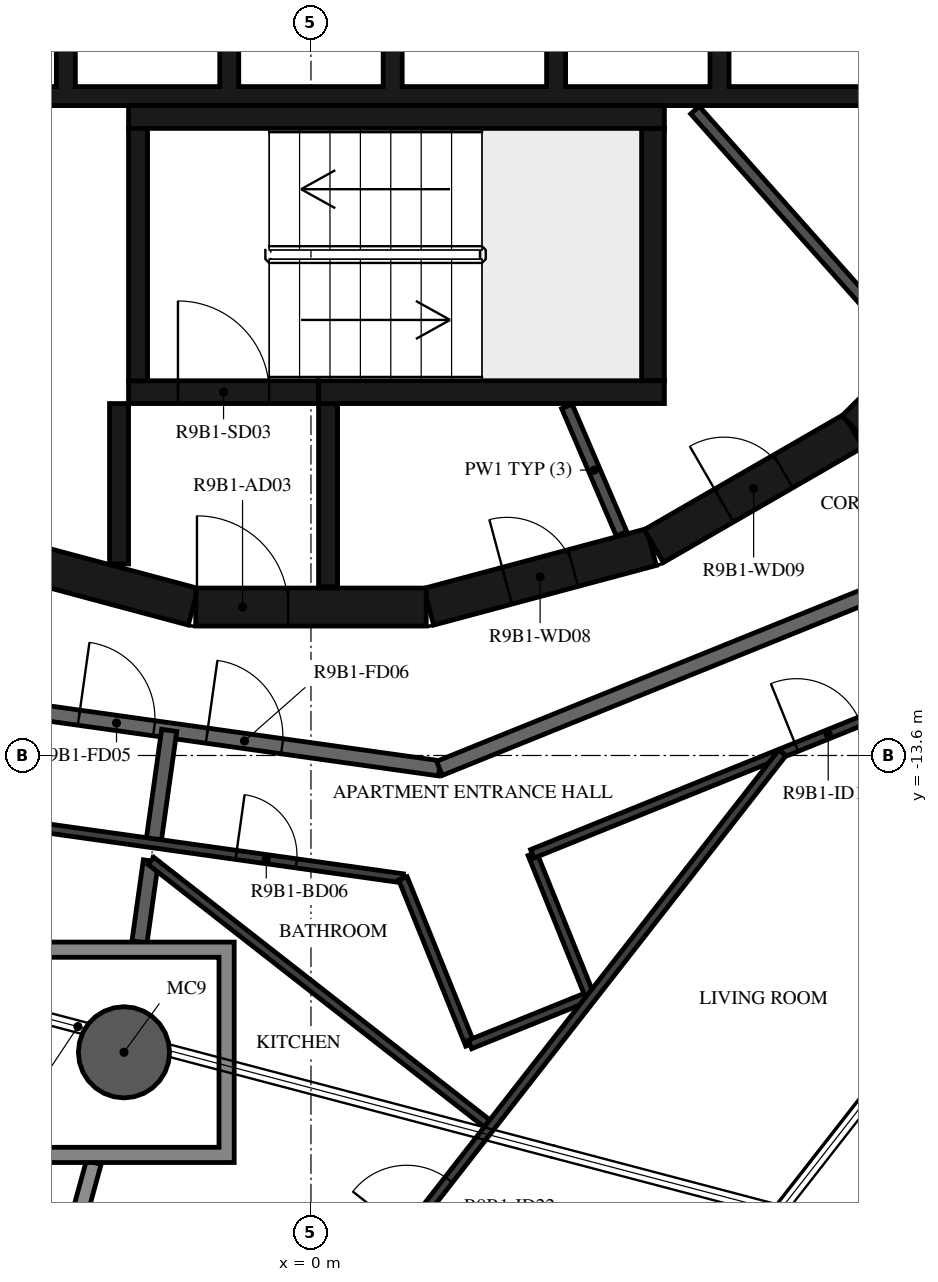
"""IFC4 building model, lengths in metres.
Left out: names, types, materials, properties, quantities, classifications, styles, units other than length and angle.
Written with IfcOpenShell. Run it as: python <this file> out.ifc"""

import sys

from ifc_helpers import new_model, si_unit, direction, frame, frame_2d, origin, origin_2d, place, context, subcontext, project, spatial, polyline, rectangle, hollow_circle, outline, extrude, element, fill, save


model = new_model("IFC4")
c1 = context("Model", 3, precision=1e-05, world=origin(), true_north=direction((0.0, 1.0)))
c2 = subcontext(c1, "Body", "Model", "MODEL_VIEW")
j1 = project(units=[si_unit("LENGTHUNIT", "METRE"), si_unit("PLANEANGLEUNIT", "RADIAN")], contexts=[c1])
p1 = place(None, origin())
s1 = spatial("IfcSite", under=j1, at=p1, CompositionType="ELEMENT")
p2 = place(p1, origin())
s2 = spatial("IfcBuilding", under=s1, at=p2, CompositionType="ELEMENT")
p3 = place(p2, frame((0.0, 0.0, 350.5)))
s3 = spatial("IfcBuildingStorey", under=s2, at=p3, CompositionType="ELEMENT", Elevation=350.5)
p4 = place(p3, frame((-2.46, -17.505, -0.38), z_axis=(0.0, 0.0, 1.0), x_axis=(1.0, 0.0, 0.0)))
e1 = element("IfcColumn", 1, at=p4, inside=s3, PredefinedType="COLUMN", context=c2, shape_type="SweptSolid", body=[
    extrude(hollow_circle(Radius=0.6, WallThickness=0.03, at=origin_2d()), origin(), (0.0, 0.0, 1.0), 3.5),
])
p5 = place(p3, frame((1.55, -11.643, 0.0), z_axis=(0.0, 0.0, 1.0), x_axis=(0.965948410781, 0.258734743916, 0.0)))
e2 = element("IfcWall", 2, at=p5, inside=s3, PredefinedType="SHEAR", context=c2, shape_type="SweptSolid", body=[
    extrude(rectangle(XDim=3.033, YDim=0.5, at=frame_2d((1.516, 0.0))), origin(), (0.0, 0.0, 1.0), 3.12),
])
p6 = place(p5, frame((1.066, 0.0, 0.0)))
e3 = element("IfcOpeningElement", 3, at=p6, cuts=e2, PredefinedType="OPENING", context=c2, shape_type="SweptSolid", body=[
    extrude(rectangle(XDim=0.9, YDim=2.1, at=frame_2d((0.45, 1.05))), frame((0.0, 0.26, 0.0), z_axis=(0.0, -1.0, 0.0), x_axis=(1.0, 0.0, 0.0)), (0.0, 0.0, 1.0), 0.52),
])
p7 = place(p3, frame((4.51, -10.845, 0.0), z_axis=(0.0, 0.0, 1.0), x_axis=(0.865975092491, 0.500087131594, 0.0)))
e4 = element("IfcWall", 4, at=p7, inside=s3, PredefinedType="SHEAR", context=c2, shape_type="SweptSolid", body=[
    extrude(rectangle(XDim=3.033, YDim=0.5, at=frame_2d((1.516, 0.0))), origin(), (0.0, 0.0, 1.0), 3.12),
])
p8 = place(p7, frame((1.066, 0.0, 0.0)))
e5 = element("IfcOpeningElement", 5, at=p8, cuts=e4, PredefinedType="OPENING", context=c2, shape_type="SweptSolid", body=[
    extrude(rectangle(XDim=0.9, YDim=2.1, at=frame_2d((0.45, 1.05))), frame((0.0, 0.26, 0.0), z_axis=(0.0, -1.0, 0.0), x_axis=(1.0, 0.0, 0.0)), (0.0, 0.0, 1.0), 0.52),
])
p9 = place(p3, frame((7.164, -9.308, 0.0), z_axis=(0.0, 0.0, 1.0), x_axis=(0.707106781187, 0.707106781187, 0.0)))
e6 = element("IfcWall", 6, at=p9, inside=s3, PredefinedType="SHEAR", context=c2, shape_type="SweptSolid", body=[
    extrude(rectangle(XDim=3.032, YDim=0.5, at=frame_2d((1.516, 0.0))), origin(), (0.0, 0.0, 1.0), 3.12),
])
p10 = place(p9, frame((1.566, 0.0, 0.0)))
e7 = element("IfcOpeningElement", 7, at=p10, cuts=e6, PredefinedType="OPENING", context=c2, shape_type="SweptSolid", body=[
    extrude(rectangle(XDim=0.9, YDim=2.1, at=frame_2d((0.45, 1.05))), frame((0.0, 0.26, 0.0), z_axis=(0.0, -1.0, 0.0), x_axis=(1.0, 0.0, 0.0)), (0.0, 0.0, 1.0), 0.52),
])
p11 = place(p3, frame((-4.479, -10.858, 0.0), z_axis=(0.0, 0.0, 1.0), x_axis=(0.965948410781, -0.258734743916, 0.0)))
e8 = element("IfcWall", 8, at=p11, inside=s3, PredefinedType="SHEAR", context=c2, shape_type="SweptSolid", body=[
    extrude(rectangle(XDim=3.033, YDim=0.5, at=frame_2d((1.516, 0.0))), origin(), (0.0, 0.0, 1.0), 3.12),
])
p12 = place(p3, frame((-1.516, -11.647, 0.0), z_axis=(0.0, 0.0, 1.0), x_axis=(1.0, 0.0, 0.0)))
e9 = element("IfcWall", 9, at=p12, inside=s3, PredefinedType="SHEAR", context=c2, shape_type="SweptSolid", body=[
    extrude(rectangle(XDim=3.033, YDim=0.5, at=frame_2d((1.516, 0.0))), origin(), (0.0, 0.0, 1.0), 3.12),
])
p13 = place(p12, frame((0.016, 0.0, 0.0)))
e10 = element("IfcOpeningElement", 10, at=p13, cuts=e9, PredefinedType="OPENING", context=c2, shape_type="SweptSolid", body=[
    extrude(rectangle(XDim=1.2, YDim=2.1, at=frame_2d((0.6, 1.05))), frame((0.0, 0.26, 0.0), z_axis=(0.0, -1.0, 0.0), x_axis=(1.0, 0.0, 0.0)), (0.0, 0.0, 1.0), 0.52),
])
p14 = place(p3, frame((-2.275, -8.67, 0.0), z_axis=(0.0, 0.0, 1.0), x_axis=(0.0, 1.0, 0.0)))
e11 = element("IfcWall", 11, at=p14, inside=s3, PredefinedType="SHEAR", context=c2, shape_type="SweptSolid", body=[
    extrude(rectangle(XDim=3.32, YDim=0.25, at=frame_2d((1.66, 0.0))), origin(), (0.0, 0.0, 1.0), 3.12),
])
p15 = place(p3, frame((-2.4, -5.2, 0.0), z_axis=(0.0, 0.0, 1.0), x_axis=(1.0, 0.0, 0.0)))
e12 = element("IfcWall", 12, at=p15, inside=s3, PredefinedType="SHEAR", context=c2, shape_type="SweptSolid", body=[
    extrude(rectangle(XDim=7.05, YDim=0.3, at=frame_2d((3.525, 0.0))), origin(), (0.0, 0.0, 1.0), 3.12),
])
p16 = place(p3, frame((4.5, -8.67, 0.0), z_axis=(0.0, 0.0, 1.0), x_axis=(0.0, 1.0, 0.0)))
e13 = element("IfcWall", 13, at=p16, inside=s3, PredefinedType="SHEAR", context=c2, shape_type="SweptSolid", body=[
    extrude(rectangle(XDim=3.32, YDim=0.3, at=frame_2d((1.66, 0.0))), origin(), (0.0, 0.0, 1.0), 3.12),
])
p17 = place(p3, frame((0.1, -8.82, 0.0), z_axis=(0.0, 0.0, 1.0), x_axis=(1.0, 0.0, 0.0)))
e14 = element("IfcWall", 14, at=p17, inside=s3, PredefinedType="SHEAR", context=c2, shape_type="SweptSolid", body=[
    extrude(rectangle(XDim=4.55, YDim=0.3, at=frame_2d((2.275, 0.0))), origin(), (0.0, 0.0, 1.0), 3.12),
])
p18 = place(p3, frame((-2.4, -8.82, 0.0), z_axis=(0.0, 0.0, 1.0), x_axis=(1.0, 0.0, 0.0)))
e15 = element("IfcWall", 15, at=p18, inside=s3, PredefinedType="SHEAR", context=c2, shape_type="SweptSolid", body=[
    extrude(rectangle(XDim=2.5, YDim=0.3, at=frame_2d((1.25, 0.0))), origin(), (0.0, 0.0, 1.0), 3.12),
])
p19 = place(p18, frame((0.65, 0.0, 0.0)))
e16 = element("IfcOpeningElement", 16, at=p19, cuts=e15, PredefinedType="OPENING", context=c2, shape_type="SweptSolid", body=[
    extrude(rectangle(XDim=1.2, YDim=2.1, at=frame_2d((0.6, 1.05))), frame((0.0, 0.16, 0.0), z_axis=(0.0, -1.0, 0.0), x_axis=(1.0, 0.0, 0.0)), (0.0, 0.0, 1.0), 0.32),
])
p20 = place(p3, frame((-2.525, -8.97, 0.0), z_axis=(0.0, 0.0, 1.0), x_axis=(0.0, -1.0, 0.0)))
e17 = element("IfcWall", 17, at=p20, inside=s3, PredefinedType="SHEAR", context=c2, shape_type="SweptSolid", body=[
    extrude(rectangle(XDim=2.11, YDim=0.25, at=frame_2d((1.055, 0.0))), origin(), (0.0, 0.0, 1.0), 3.12),
])
p21 = place(p3, frame((0.225, -8.97, 0.0), z_axis=(0.0, 0.0, 1.0), x_axis=(0.0, -1.0, 0.0)))
e18 = element("IfcWall", 18, at=p21, inside=s3, PredefinedType="SHEAR", context=c2, shape_type="SweptSolid", body=[
    extrude(rectangle(XDim=2.41, YDim=0.25, at=frame_2d((1.205, 0.0))), origin(), (0.0, 0.0, 1.0), 3.12),
])
p22 = place(p3, origin())
e19 = element("IfcWall", 19, at=p22, inside=s3, PredefinedType="SHEAR", context=c2, shape_type="SweptSolid", body=[
    extrude(outline(polyline([(9.8, -5.05), (9.8, -4.8), (9.8, -1.9), (9.55, -1.9), (9.55, -4.8), (7.65, -4.8), (7.65, -1.9), (7.4, -1.9), (7.4, -4.8), (5.5, -4.8), (5.5, -1.9), (5.25, -1.9), (5.25, -4.8), (3.35, -4.8), (3.35, -1.9), (3.1, -1.9), (3.1, -4.8), (1.2, -4.8), (1.2, -1.9), (0.95, -1.9), (0.95, -4.8), (-0.95, -4.8), (-0.95, -1.9), (-1.2, -1.9), (-1.2, -4.8), (-3.1, -4.8), (-3.1, -1.9), (-3.35, -1.9), (-3.35, -4.8), (-5.25, -4.8), (-5.25, -1.9), (-5.5, -1.9), (-5.5, -4.8), (-9.55, -4.8), (-9.55, -1.9), (-9.8, -1.9), (-9.8, -4.8), (-9.8, -5.05), (9.8, -5.05)])), origin(), (0.0, 0.0, 1.0), 3.12),
])
p23 = place(p3, frame((7.842, -8.248, 0.0), z_axis=(0.0, 0.0, 1.0), x_axis=(-0.66446128181, 0.747322691329, 0.0)))
e20 = element("IfcWall", 20, at=p23, inside=s3, PredefinedType="PARTITIONING", context=c2, shape_type="SweptSolid", body=[
    extrude(rectangle(XDim=4.198, YDim=0.15, at=frame_2d((2.099, 0.0))), origin(), (0.0, 0.0, 1.0), 3.12),
])
p24 = place(p3, frame((3.367, -9.007, 0.0), z_axis=(0.0, 0.0, 1.0), x_axis=(0.394387482265, -0.918944238696, 0.0)))
e21 = element("IfcWall", 21, at=p24, inside=s3, PredefinedType="PARTITIONING", context=c2, shape_type="SweptSolid", body=[
    extrude(rectangle(XDim=1.825, YDim=0.15, at=frame_2d((0.913, 0.0))), origin(), (0.0, 0.0, 1.0), 3.12),
])
p25 = place(p3, frame((-5.42, -12.77, 0.0), z_axis=(0.0, 0.0, 1.0), x_axis=(0.990270565508, -0.139155334385, 0.0)))
e22 = element("IfcWall", 22, at=p25, inside=s3, PredefinedType="STANDARD", context=c2, shape_type="SweptSolid", body=[
    extrude(rectangle(XDim=7.181, YDim=0.2, at=frame_2d((3.59, 0.0))), origin(), (0.0, 0.0, 1.0), 3.12),
])
p26 = place(p25, frame((2.39, 0.0, 0.0)))
e23 = element("IfcOpeningElement", 23, at=p26, cuts=e22, PredefinedType="OPENING", context=c2, shape_type="SweptSolid", body=[
    extrude(rectangle(XDim=1.0, YDim=2.1, at=frame_2d((0.5, 1.05))), frame((0.0, 0.11, 0.0), z_axis=(0.0, -1.0, 0.0), x_axis=(1.0, 0.0, 0.0)), (0.0, 0.0, 1.0), 0.22),
])
p27 = place(p25, frame((4.091, 0.0, 0.0)))
e24 = element("IfcOpeningElement", 24, at=p27, cuts=e22, PredefinedType="OPENING", context=c2, shape_type="SweptSolid", body=[
    extrude(rectangle(XDim=1.0, YDim=2.1, at=frame_2d((0.5, 1.05))), frame((0.0, 0.11, 0.0), z_axis=(0.0, -1.0, 0.0), x_axis=(1.0, 0.0, 0.0)), (0.0, 0.0, 1.0), 0.22),
])
p28 = place(p3, frame((1.691, -13.769, 0.0), z_axis=(0.0, 0.0, 1.0), x_axis=(0.92717916932, 0.374618189599, 0.0)))
e25 = element("IfcWall", 25, at=p28, inside=s3, PredefinedType="STANDARD", context=c2, shape_type="SweptSolid", body=[
    extrude(rectangle(XDim=7.181, YDim=0.2, at=frame_2d((3.591, 0.0))), origin(), (0.0, 0.0, 1.0), 3.12),
])
p29 = place(p3, frame((-2.073, -14.755, 0.0), z_axis=(0.0, 0.0, 1.0), x_axis=(0.139005431033, 0.990291618738, 0.0)))
e26 = element("IfcWall", 26, at=p29, inside=s3, PredefinedType="STANDARD", context=c2, shape_type="SweptSolid", body=[
    extrude(rectangle(XDim=1.5, YDim=0.2, at=frame_2d((0.75, 0.0))), origin(), (0.0, 0.0, 1.0), 3.12),
])
p30 = place(p3, frame((-2.256, -16.055, 0.0), z_axis=(0.0, 0.0, 1.0), x_axis=(0.139109268657, 0.990277037689, 0.0)))
e27 = element("IfcWall", 27, at=p30, inside=s3, PredefinedType="STANDARD", context=c2, shape_type="SweptSolid", body=[
    extrude(rectangle(XDim=1.079, YDim=0.2, at=frame_2d((0.54, 0.0))), origin(), (0.0, 0.0, 1.0), 3.12),
])
p31 = place(p3, frame((-4.574, -25.21, 0.0), z_axis=(0.0, 0.0, 1.0), x_axis=(0.264579024648, 0.964364007892, 0.0)))
e28 = element("IfcWall", 28, at=p31, inside=s3, PredefinedType="STANDARD", context=c2, shape_type="SweptSolid", body=[
    extrude(rectangle(XDim=6.486, YDim=0.2, at=frame_2d((3.243, 0.0))), origin(), (0.0, 0.0, 1.0), 2.73),
])
p32 = place(p3, frame((-6.027, -14.199, 0.0), z_axis=(0.0, 0.0, 1.0), x_axis=(0.990271617837, -0.139147845494, 0.0)))
e29 = element("IfcWall", 29, at=p32, inside=s3, PredefinedType="PARTITIONING", context=c2, shape_type="SweptSolid", body=[
    extrude(rectangle(XDim=7.308, YDim=0.12, at=frame_2d((3.654, 0.0))), origin(), (0.0, 0.0, 1.0), 3.12),
])
p33 = place(p32, frame((5.093, 0.0, 0.0)))
e30 = element("IfcOpeningElement", 30, at=p33, cuts=e29, PredefinedType="OPENING", context=c2, shape_type="SweptSolid", body=[
    extrude(rectangle(XDim=0.8, YDim=2.1, at=frame_2d((0.4, 1.05))), frame((0.0, 0.07, 0.0), z_axis=(0.0, -1.0, 0.0), x_axis=(1.0, 0.0, 0.0)), (0.0, 0.0, 1.0), 0.14),
])
p34 = place(p3, frame((1.209, -15.216, 0.0), z_axis=(0.0, 0.0, 1.0), x_axis=(0.374531550488, -0.927214170345, 0.0)))
e31 = element("IfcWall", 31, at=p34, inside=s3, PredefinedType="PARTITIONING", context=c2, shape_type="SweptSolid", body=[
    extrude(rectangle(XDim=2.357, YDim=0.12, at=frame_2d((1.179, 0.0))), origin(), (0.0, 0.0, 1.0), 3.12),
])
p35 = place(p3, frame((2.092, -17.402, 0.0), z_axis=(0.0, 0.0, 1.0), x_axis=(0.927153589835, 0.374681492546, 0.0)))
e32 = element("IfcWall", 32, at=p35, inside=s3, PredefinedType="PARTITIONING", context=c2, shape_type="SweptSolid", body=[
    extrude(rectangle(XDim=1.7, YDim=0.12, at=frame_2d((0.85, 0.0))), origin(), (0.0, 0.0, 1.0), 3.12),
])
p36 = place(p3, frame((3.668, -16.765, 0.0), z_axis=(0.0, 0.0, 1.0), x_axis=(-0.374621045498, 0.927178015416, 0.0)))
e33 = element("IfcWall", 33, at=p36, inside=s3, PredefinedType="PARTITIONING", context=c2, shape_type="SweptSolid", body=[
    extrude(rectangle(XDim=2.018, YDim=0.12, at=frame_2d((1.009, 0.0))), origin(), (0.0, 0.0, 1.0), 3.12),
])
p37 = place(p3, frame((2.912, -14.894, 0.0), z_axis=(0.0, 0.0, 1.0), x_axis=(0.927182280165, 0.374610490174, 0.0)))
e34 = element("IfcWall", 34, at=p37, inside=s3, PredefinedType="PARTITIONING", context=c2, shape_type="SweptSolid", body=[
    extrude(rectangle(XDim=6.872, YDim=0.12, at=frame_2d((3.436, 0.0))), origin(), (0.0, 0.0, 1.0), 3.12),
])
p38 = place(p37, frame((3.748, 0.0, 0.0)))
e35 = element("IfcOpeningElement", 35, at=p38, cuts=e34, PredefinedType="OPENING", context=c2, shape_type="SweptSolid", body=[
    extrude(rectangle(XDim=0.9, YDim=2.1, at=frame_2d((0.45, 1.05))), frame((0.0, 0.07, 0.0), z_axis=(0.0, -1.0, 0.0), x_axis=(1.0, 0.0, 0.0)), (0.0, 0.0, 1.0), 0.14),
])
p39 = place(p3, frame((2.363, -18.478, 0.0), z_axis=(0.0, 0.0, 1.0), x_axis=(-0.788010669333, 0.615661583191, 0.0)))
e36 = element("IfcWall", 36, at=p39, inside=s3, PredefinedType="PARTITIONING", context=c2, shape_type="SweptSolid", body=[
    extrude(rectangle(XDim=5.672, YDim=0.12, at=frame_2d((2.836, 0.0))), origin(), (0.0, 0.0, 1.0), 3.12),
])
p40 = place(p3, frame((1.136, -20.049, 0.0), z_axis=(0.0, 0.0, 1.0), x_axis=(0.615662465763, 0.788009979792, 0.0)))
e37 = element("IfcWall", 37, at=p40, inside=s3, PredefinedType="PARTITIONING", context=c2, shape_type="SweptSolid", body=[
    extrude(rectangle(XDim=8.229, YDim=0.12, at=frame_2d((4.114, 0.0))), origin(), (0.0, 0.0, 1.0), 3.12),
])
p41 = place(p40, frame((0.2, 0.0, 0.0)))
e38 = element("IfcOpeningElement", 38, at=p41, cuts=e37, PredefinedType="OPENING", context=c2, shape_type="SweptSolid", body=[
    extrude(rectangle(XDim=0.9, YDim=2.1, at=frame_2d((0.45, 1.05))), frame((0.0, 0.07, 0.0), z_axis=(0.0, -1.0, 0.0), x_axis=(1.0, 0.0, 0.0)), (0.0, 0.0, 1.0), 0.14),
])
p42 = place(p3, origin())
e39 = element("IfcWall", 39, at=p42, inside=s3, PredefinedType="STANDARD", context=c2, shape_type="SweptSolid", body=[
    extrude(outline(polyline([(-1.01, -16.055), (-1.01, -18.955), (-3.91, -18.955), (-3.91, -16.055), (-1.01, -16.055)]), holes=[polyline([(-3.71, -18.755), (-1.21, -18.755), (-1.21, -16.255), (-3.71, -16.255), (-3.71, -18.755)])]), origin(), (0.0, 0.0, 1.0), 3.12),
])
p43 = place(p19, origin())
e40 = element("IfcDoor", 40, at=p43, inside=s3, OperationType="SINGLE_SWING_LEFT", PredefinedType="DOOR", context=c2, shape_type="SweptSolid", body=[
    extrude(rectangle(XDim=1.2, YDim=2.1, at=frame_2d((0.6, 1.05))), frame((0.0, 0.025, 0.0), z_axis=(0.0, -1.0, 0.0), x_axis=(1.0, 0.0, 0.0)), (0.0, 0.0, 1.0), 0.05),
])
fill(e16, e40)
p44 = place(p13, origin())
e41 = element("IfcDoor", 41, at=p44, inside=s3, OperationType="SINGLE_SWING_RIGHT", PredefinedType="DOOR", context=c2, shape_type="SweptSolid", body=[
    extrude(rectangle(XDim=1.2, YDim=2.1, at=frame_2d((0.6, 1.05))), frame((0.0, 0.025, 0.0), z_axis=(0.0, -1.0, 0.0), x_axis=(1.0, 0.0, 0.0)), (0.0, 0.0, 1.0), 0.05),
])
fill(e10, e41)
p45 = place(p6, origin())
e42 = element("IfcDoor", 42, at=p45, inside=s3, OperationType="SINGLE_SWING_RIGHT", PredefinedType="DOOR", context=c2, shape_type="SweptSolid", body=[
    extrude(rectangle(XDim=0.9, YDim=2.1, at=frame_2d((0.45, 1.05))), frame((0.0, 0.025, 0.0), z_axis=(0.0, -1.0, 0.0), x_axis=(1.0, 0.0, 0.0)), (0.0, 0.0, 1.0), 0.05),
])
fill(e3, e42)
p46 = place(p8, origin())
e43 = element("IfcDoor", 43, at=p46, inside=s3, OperationType="SINGLE_SWING_LEFT", PredefinedType="DOOR", context=c2, shape_type="SweptSolid", body=[
    extrude(rectangle(XDim=0.9, YDim=2.1, at=frame_2d((0.45, 1.05))), frame((0.0, 0.025, 0.0), z_axis=(0.0, -1.0, 0.0), x_axis=(1.0, 0.0, 0.0)), (0.0, 0.0, 1.0), 0.05),
])
fill(e5, e43)
p47 = place(p26, origin())
e44 = element("IfcDoor", 44, at=p47, inside=s3, OperationType="SINGLE_SWING_RIGHT", PredefinedType="DOOR", context=c2, shape_type="SweptSolid", body=[
    extrude(rectangle(XDim=1.0, YDim=2.1, at=frame_2d((0.5, 1.05))), frame((0.0, 0.025, 0.0), z_axis=(0.0, -1.0, 0.0), x_axis=(1.0, 0.0, 0.0)), (0.0, 0.0, 1.0), 0.05),
])
fill(e23, e44)
p48 = place(p27, origin())
e45 = element("IfcDoor", 45, at=p48, inside=s3, OperationType="SINGLE_SWING_RIGHT", PredefinedType="DOOR", context=c2, shape_type="SweptSolid", body=[
    extrude(rectangle(XDim=1.0, YDim=2.1, at=frame_2d((0.5, 1.05))), frame((0.0, 0.025, 0.0), z_axis=(0.0, -1.0, 0.0), x_axis=(1.0, 0.0, 0.0)), (0.0, 0.0, 1.0), 0.05),
])
fill(e24, e45)
p49 = place(p33, origin())
e46 = element("IfcDoor", 46, at=p49, inside=s3, OperationType="SINGLE_SWING_LEFT", PredefinedType="DOOR", context=c2, shape_type="SweptSolid", body=[
    extrude(rectangle(XDim=0.8, YDim=2.1, at=frame_2d((0.4, 1.05))), frame((0.0, 0.025, 0.0), z_axis=(0.0, -1.0, 0.0), x_axis=(1.0, 0.0, 0.0)), (0.0, 0.0, 1.0), 0.05),
])
fill(e30, e46)
p50 = place(p38, origin())
e47 = element("IfcDoor", 47, at=p50, inside=s3, OperationType="SINGLE_SWING_LEFT", PredefinedType="DOOR", context=c2, shape_type="SweptSolid", body=[
    extrude(rectangle(XDim=0.9, YDim=2.1, at=frame_2d((0.45, 1.05))), frame((0.0, 0.025, 0.0), z_axis=(0.0, -1.0, 0.0), x_axis=(1.0, 0.0, 0.0)), (0.0, 0.0, 1.0), 0.05),
])
fill(e35, e47)
p51 = place(p41, origin())
e48 = element("IfcDoor", 48, at=p51, inside=s3, OperationType="SINGLE_SWING_RIGHT", PredefinedType="DOOR", context=c2, shape_type="SweptSolid", body=[
    extrude(rectangle(XDim=0.9, YDim=2.1, at=frame_2d((0.45, 1.05))), frame((0.0, 0.025, 0.0), z_axis=(0.0, -1.0, 0.0), x_axis=(1.0, 0.0, 0.0)), (0.0, 0.0, 1.0), 0.05),
])
fill(e38, e48)
save(model, sys.argv[1])
